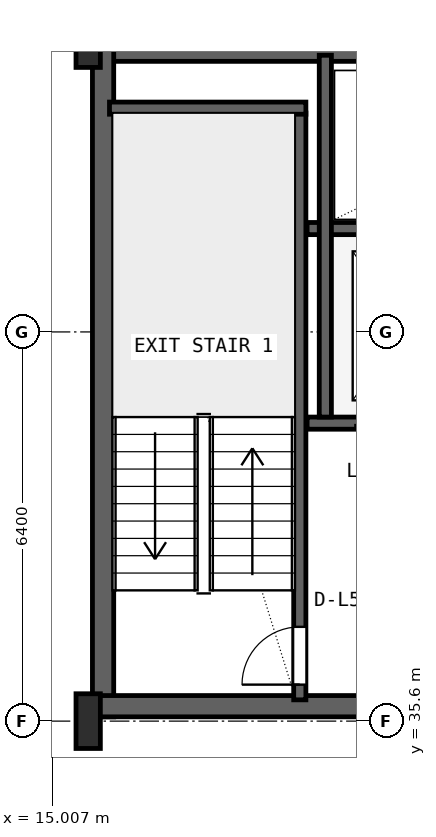
"""IFC4 building model, lengths in metres.
Left out: names, types, materials, properties, quantities, classifications, styles, units other than length and angle.
Written with IfcOpenShell. Run it as: python <this file> out.ifc"""

import sys

from ifc_helpers import new_model, si_unit, direction, frame, frame_2d, origin, origin_2d, place, context, subcontext, project, spatial, rectangle, i_section, extrude, source, transform, mapped, element, fill, save


model = new_model("IFC4")
c1 = context("Model", 3, precision=1e-05, world=origin(), true_north=direction((0.0, 1.0)))
c2 = subcontext(c1, "Body", "Model", "MODEL_VIEW")
j1 = project(units=[si_unit("LENGTHUNIT", "METRE"), si_unit("PLANEANGLEUNIT", "RADIAN")], contexts=[c1])
p1 = place(None, origin())
s1 = spatial("IfcSite", under=j1, at=p1, CompositionType="ELEMENT")
p2 = place(p1, origin())
s2 = spatial("IfcBuilding", under=s1, at=p2, CompositionType="ELEMENT")
p3 = place(p2, frame((0.0, 0.0, 222.6)))
s3 = spatial("IfcBuildingStorey", under=s2, at=p3, CompositionType="ELEMENT", Elevation=222.6)
p4 = place(p3, frame((15.6, 46.625, 0.0), z_axis=(0.0, 0.0, 1.0), x_axis=(1.0, 0.0, 0.0)))
e1 = element("IfcWall", 1, at=p4, inside=s3, PredefinedType="SHEAR", context=c2, shape_type="SweptSolid", body=[
    extrude(rectangle(XDim=36.8, YDim=0.35, at=frame_2d((18.4, 0.0))), origin(), (0.0, 0.0, 1.0), 3.55),
])
p5 = place(p3, frame((15.845, 35.67, 0.0), z_axis=(0.0, 0.0, 1.0), x_axis=(0.0, 1.0, 0.0)))
e2 = element("IfcWall", 2, at=p5, inside=s3, PredefinedType="SHEAR", context=c2, shape_type="SweptSolid", body=[
    extrude(rectangle(XDim=11.13, YDim=0.35, at=frame_2d((5.565, 0.0))), origin(), (0.0, 0.0, 1.0), 3.55),
])
p6 = place(p3, frame((15.67, 35.845, 0.0), z_axis=(0.0, 0.0, 1.0), x_axis=(1.0, 0.0, 0.0)))
e3 = element("IfcWall", 3, at=p6, inside=s3, PredefinedType="SHEAR", context=c2, shape_type="SweptSolid", body=[
    extrude(rectangle(XDim=9.13, YDim=0.35, at=frame_2d((4.565, 0.0))), origin(), (0.0, 0.0, 1.0), 3.55),
])
p7 = place(p6, frame((5.4, 0.0, 0.0)))
e4 = element("IfcOpeningElement", 4, at=p7, cuts=e3, PredefinedType="OPENING", context=c2, shape_type="SweptSolid", body=[
    extrude(rectangle(XDim=1.0, YDim=2.1, at=frame_2d((0.5, 1.05))), frame((0.0, 0.185, 0.0), z_axis=(0.0, -1.0, 0.0), x_axis=(1.0, 0.0, 0.0)), (0.0, 0.0, 1.0), 0.37),
])
m1 = source(origin(), c2, "Body", "SweptSolid", [
    extrude(i_section(OverallWidth=0.4, OverallDepth=0.9, WebThickness=0.016, FlangeThickness=0.028, FilletRadius=0.016, at=origin_2d()), origin(), (0.0, 0.0, 1.0), 3.8),
])
for number, where, z_axis, x_axis in (
    (5, (15.6, 35.6, 0.0), (0.0, 0.0, 1.0), (1.0, 0.0, 0.0)),
    (6, (15.6, 46.8, 0.0), (0.0, 0.0, 1.0), (1.0, 0.0, 0.0)),
):
    element("IfcColumn", number, at=place(p3, frame(where, z_axis=z_axis, x_axis=x_axis)), inside=s3, PredefinedType="COLUMN", context=c2, shape_type="MappedRepresentation", body=[
        mapped(m1, transform((0.0, 0.0, 0.0), x_axis=(1.0, 0.0, 0.0), y_axis=(0.0, 1.0, 0.0), z_axis=(0.0, 0.0, 1.0), scale=1.0)),
    ])
p8 = place(p3, frame((19.08, 35.95, 0.0), z_axis=(0.0, 0.0, 1.0), x_axis=(0.0, 1.0, 0.0)))
e7 = element("IfcWall", 7, at=p8, inside=s3, PredefinedType="SHEAR", context=c2, shape_type="SweptSolid", body=[
    extrude(rectangle(XDim=9.65, YDim=0.2, at=frame_2d((4.825, 0.0))), origin(), (0.0, 0.0, 1.0), 3.55),
])
p9 = place(p8, frame((0.25, 0.0, 0.0)))
e8 = element("IfcOpeningElement", 8, at=p9, cuts=e7, PredefinedType="OPENING", context=c2, shape_type="SweptSolid", body=[
    extrude(rectangle(XDim=0.95, YDim=2.1, at=frame_2d((0.475, 1.05))), frame((0.0, 0.11, 0.0), z_axis=(0.0, -1.0, 0.0), x_axis=(1.0, 0.0, 0.0)), (0.0, 0.0, 1.0), 0.22),
])
p10 = place(p3, frame((15.95, 45.68, 0.0), z_axis=(0.0, 0.0, 1.0), x_axis=(1.0, 0.0, 0.0)))
e9 = element("IfcWall", 9, at=p10, inside=s3, PredefinedType="SHEAR", context=c2, shape_type="SweptSolid", body=[
    extrude(rectangle(XDim=3.23, YDim=0.2, at=frame_2d((1.615, 0.0))), origin(), (0.0, 0.0, 1.0), 3.55),
])
p11 = place(p3, frame((19.2, 40.5, 0.0), z_axis=(0.0, 0.0, 1.0), x_axis=(1.0, 0.0, 0.0)))
e10 = element("IfcWall", 10, at=p11, inside=s3, PredefinedType="SHEAR", context=c2, shape_type="SweptSolid", body=[
    extrude(rectangle(XDim=5.52, YDim=0.2, at=frame_2d((2.76, 0.0))), origin(), (0.0, 0.0, 1.0), 3.55),
])
p12 = place(p11, frame((1.05, 0.0, 0.0)))
e11 = element("IfcOpeningElement", 11, at=p12, cuts=e10, PredefinedType="OPENING", context=c2, shape_type="SweptSolid", body=[
    extrude(rectangle(XDim=1.1, YDim=2.18, at=frame_2d((0.55, 1.09))), frame((0.0, 0.11, 0.0), z_axis=(0.0, -1.0, 0.0), x_axis=(1.0, 0.0, 0.0)), (0.0, 0.0, 1.0), 0.22),
])
p13 = place(p11, frame((3.65, 0.0, 0.0)))
e12 = element("IfcOpeningElement", 12, at=p13, cuts=e10, PredefinedType="OPENING", context=c2, shape_type="SweptSolid", body=[
    extrude(rectangle(XDim=1.1, YDim=2.18, at=frame_2d((0.55, 1.09))), frame((0.0, 0.11, 0.0), z_axis=(0.0, -1.0, 0.0), x_axis=(1.0, 0.0, 0.0)), (0.0, 0.0, 1.0), 0.22),
])
p14 = place(p3, frame((19.2, 43.7, 0.0), z_axis=(0.0, 0.0, 1.0), x_axis=(1.0, 0.0, 0.0)))
e13 = element("IfcWall", 13, at=p14, inside=s3, PredefinedType="SHEAR", context=c2, shape_type="SweptSolid", body=[
    extrude(rectangle(XDim=5.52, YDim=0.2, at=frame_2d((2.76, 0.0))), origin(), (0.0, 0.0, 1.0), 3.55),
])
p15 = place(p3, frame((19.5, 40.6, 0.0), z_axis=(0.0, 0.0, 1.0), x_axis=(0.0, 1.0, 0.0)))
e14 = element("IfcWall", 14, at=p15, inside=s3, PredefinedType="SHEAR", context=c2, shape_type="SweptSolid", body=[
    extrude(rectangle(XDim=5.95, YDim=0.2, at=frame_2d((2.975, 0.0))), origin(), (0.0, 0.0, 1.0), 3.55),
])
m2 = source(origin(), c2, "Body", "SweptSolid", [
    extrude(rectangle(XDim=0.95, YDim=2.1, at=frame_2d((0.475, 1.05))), frame((0.0, 0.025, 0.0), z_axis=(0.0, -1.0, 0.0), x_axis=(1.0, 0.0, 0.0)), (0.0, 0.0, 1.0), 0.05),
])
p16 = place(p9, origin())
e15 = element("IfcDoor", 15, at=p16, inside=s3, OperationType="SINGLE_SWING_LEFT", PredefinedType="DOOR", context=c2, shape_type="MappedRepresentation", body=[
    mapped(m2, transform((0.0, 0.0, 0.0), x_axis=(1.0, 0.0, 0.0), y_axis=(0.0, 1.0, 0.0), z_axis=(0.0, 0.0, 1.0), scale=1.0)),
])
fill(e8, e15)
save(model, sys.argv[1])
